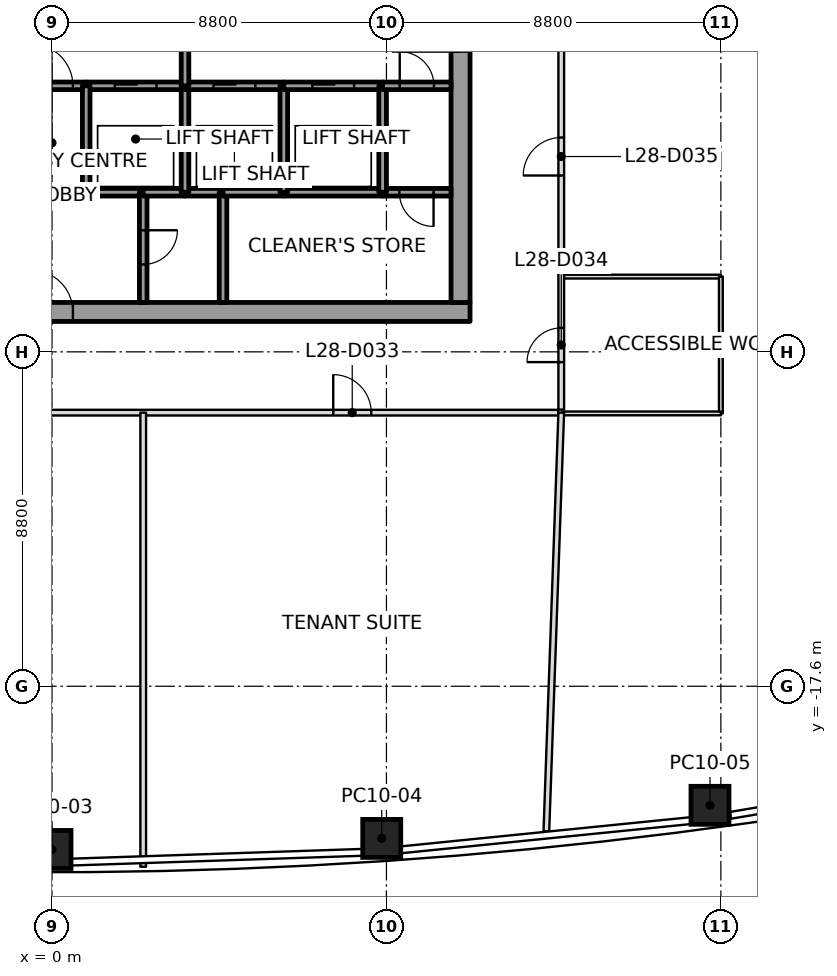
"""IFC4 building model, lengths in metres.
Left out: names, types, materials, properties, quantities, classifications, styles, units other than length and angle.
Written with IfcOpenShell. Run it as: python <this file> out.ifc"""

import sys

from ifc_helpers import new_model, si_unit, direction, frame, frame_2d, origin, origin_2d, place, context, subcontext, project, spatial, rectangle, extrude, element, fill, save


model = new_model("IFC4")
c1 = context("Model", 3, precision=1e-05, world=origin(), true_north=direction((0.0, 1.0)))
c2 = subcontext(c1, "Body", "Model", "MODEL_VIEW")
j1 = project(units=[si_unit("LENGTHUNIT", "METRE"), si_unit("PLANEANGLEUNIT", "RADIAN")], contexts=[c1])
p1 = place(None, origin())
s1 = spatial("IfcSite", under=j1, at=p1, CompositionType="ELEMENT")
p2 = place(p1, origin())
s2 = spatial("IfcBuilding", under=s1, at=p2, CompositionType="ELEMENT")
p3 = place(p2, frame((0.0, 0.0, 133.8)))
s3 = spatial("IfcBuildingStorey", under=s2, at=p3, CompositionType="ELEMENT", Elevation=133.8)
p4 = place(p3, frame((0.0, -21.894, 0.0), z_axis=(0.0, 0.01141283087, 0.999934871525), x_axis=(1.0, 0.0, 0.0)))
e1 = element("IfcColumn", 1, at=p4, inside=s3, PredefinedType="COLUMN", context=c2, shape_type="SweptSolid", body=[
    extrude(rectangle(XDim=1.0, YDim=1.0, at=origin_2d()), origin(), (0.0, 0.0, 1.0), 4.0),
])
p5 = place(p3, frame((8.677, -21.604, 0.0), z_axis=(-0.008849193104, 0.011229320904, 0.999897791843), x_axis=(0.99771962889, 0.067009688007, 0.008077365942)))
e2 = element("IfcColumn", 2, at=p5, inside=s3, PredefinedType="COLUMN", context=c2, shape_type="SweptSolid", body=[
    extrude(rectangle(XDim=1.0, YDim=1.0, at=origin_2d()), origin(), (0.0, 0.0, 1.0), 4.0),
])
p6 = place(p3, frame((17.314, -20.733, 0.0), z_axis=(-0.017696448434, 0.010495824588, 0.999788314284), x_axis=(0.990889638844, 0.133706305787, 0.016135285075)))
e3 = element("IfcColumn", 3, at=p6, inside=s3, PredefinedType="COLUMN", context=c2, shape_type="SweptSolid", body=[
    extrude(rectangle(XDim=1.0, YDim=1.0, at=origin_2d()), origin(), (0.0, 0.0, 1.0), 4.001),
])
p7 = place(p3, frame((-11.0, -7.75, 0.0), z_axis=(0.0, 0.0, 1.0), x_axis=(1.0, 0.0, 0.0)))
e4 = element("IfcWall", 4, at=p7, inside=s3, PredefinedType="SHEAR", context=c2, shape_type="SweptSolid", body=[
    extrude(rectangle(XDim=22.0, YDim=0.5, at=frame_2d((11.0, 0.0))), origin(), (0.0, 0.0, 1.0), 4.0),
])
p8 = place(p7, frame((10.45, 0.0, 0.0)))
e5 = element("IfcOpeningElement", 5, at=p8, cuts=e4, PredefinedType="OPENING", context=c2, shape_type="SweptSolid", body=[
    extrude(rectangle(XDim=1.1, YDim=2.1, at=frame_2d((0.55, 1.05))), frame((0.0, 0.25, 0.0), z_axis=(0.0, -1.0, 0.0), x_axis=(1.0, 0.0, 0.0)), (0.0, 0.0, 1.0), 0.5),
])
p9 = place(p3, frame((10.75, -7.5, 0.0), z_axis=(0.0, 0.0, 1.0), x_axis=(0.0, 1.0, 0.0)))
e6 = element("IfcWall", 6, at=p9, inside=s3, PredefinedType="SHEAR", context=c2, shape_type="SweptSolid", body=[
    extrude(rectangle(XDim=15.0, YDim=0.5, at=frame_2d((7.5, 0.0))), origin(), (0.0, 0.0, 1.0), 4.0),
])
p10 = place(p9, frame((6.6, 0.0, 0.0)))
e7 = element("IfcOpeningElement", 7, at=p10, cuts=e6, PredefinedType="OPENING", context=c2, shape_type="SweptSolid", body=[
    extrude(rectangle(XDim=1.8, YDim=2.1, at=frame_2d((0.9, 1.05))), frame((0.0, 0.25, 0.0), z_axis=(0.0, -1.0, 0.0), x_axis=(1.0, 0.0, 0.0)), (0.0, 0.0, 1.0), 0.5),
])
p11 = place(p3, frame((-0.9, -1.8, 0.0), z_axis=(0.0, 0.0, 1.0), x_axis=(1.0, 0.0, 0.0)))
e8 = element("IfcWall", 8, at=p11, inside=s3, PredefinedType="SOLIDWALL", context=c2, shape_type="SweptSolid", body=[
    extrude(rectangle(XDim=1.8, YDim=0.2, at=frame_2d((0.9, 0.0))), origin(), (0.0, 0.0, 1.0), 3.85),
])
p12 = place(p11, frame((0.35, 0.0, 0.0)))
e9 = element("IfcOpeningElement", 9, at=p12, cuts=e8, PredefinedType="OPENING", context=c2, shape_type="SweptSolid", body=[
    extrude(rectangle(XDim=1.1, YDim=2.1, at=frame_2d((0.55, 1.05))), frame((0.0, 0.1, 0.0), z_axis=(0.0, -1.0, 0.0), x_axis=(1.0, 0.0, 0.0)), (0.0, 0.0, 1.0), 0.2),
])
p13 = place(p3, frame((0.9, -1.8, 0.0), z_axis=(0.0, 0.0, 1.0), x_axis=(1.0, 0.0, 0.0)))
e10 = element("IfcWall", 10, at=p13, inside=s3, PredefinedType="SOLIDWALL", context=c2, shape_type="SweptSolid", body=[
    extrude(rectangle(XDim=2.6, YDim=0.2, at=frame_2d((1.3, 0.0))), origin(), (0.0, 0.0, 1.0), 3.85),
])
p14 = place(p13, frame((0.75, 0.0, 0.0)))
e11 = element("IfcOpeningElement", 11, at=p14, cuts=e10, PredefinedType="OPENING", context=c2, shape_type="SweptSolid", body=[
    extrude(rectangle(XDim=1.1, YDim=2.1, at=frame_2d((0.55, 1.05))), frame((0.0, 0.1, 0.0), z_axis=(0.0, -1.0, 0.0), x_axis=(1.0, 0.0, 0.0)), (0.0, 0.0, 1.0), 0.2),
])
p15 = place(p3, frame((0.9, -1.8, 0.0), z_axis=(0.0, 0.0, 1.0), x_axis=(0.0, -1.0, 0.0)))
e12 = element("IfcWall", 12, at=p15, inside=s3, PredefinedType="SOLIDWALL", context=c2, shape_type="SweptSolid", body=[
    extrude(rectangle(XDim=2.8, YDim=0.2, at=frame_2d((1.4, 0.0))), origin(), (0.0, 0.0, 1.0), 3.85),
])
p16 = place(p3, frame((0.9, -4.6, 0.0), z_axis=(0.0, 0.0, 1.0), x_axis=(1.0, 0.0, 0.0)))
e13 = element("IfcWall", 13, at=p16, inside=s3, PredefinedType="SOLIDWALL", context=c2, shape_type="SweptSolid", body=[
    extrude(rectangle(XDim=1.5, YDim=0.2, at=frame_2d((0.75, 0.0))), origin(), (0.0, 0.0, 1.0), 3.85),
])
p17 = place(p3, frame((2.4, -4.6, 0.0), z_axis=(0.0, 0.0, 1.0), x_axis=(0.0, -1.0, 0.0)))
e14 = element("IfcWall", 14, at=p17, inside=s3, PredefinedType="SOLIDWALL", context=c2, shape_type="SweptSolid", body=[
    extrude(rectangle(XDim=2.9, YDim=0.2, at=frame_2d((1.45, 0.0))), origin(), (0.0, 0.0, 1.0), 3.85),
])
p18 = place(p17, frame((1.0, 0.0, 0.0)))
e15 = element("IfcOpeningElement", 15, at=p18, cuts=e14, PredefinedType="OPENING", context=c2, shape_type="SweptSolid", body=[
    extrude(rectangle(XDim=0.9, YDim=2.1, at=frame_2d((0.45, 1.05))), frame((0.0, 0.1, 0.0), z_axis=(0.0, -1.0, 0.0), x_axis=(1.0, 0.0, 0.0)), (0.0, 0.0, 1.0), 0.2),
])
p19 = place(p3, frame((3.5, -4.6, 0.0), z_axis=(0.0, 0.0, 1.0), x_axis=(-1.0, 0.0, 0.0)))
e16 = element("IfcWall", 16, at=p19, inside=s3, PredefinedType="SOLIDWALL", context=c2, shape_type="SweptSolid", body=[
    extrude(rectangle(XDim=1.1, YDim=0.2, at=frame_2d((0.55, 0.0))), origin(), (0.0, 0.0, 1.0), 3.85),
])
p20 = place(p3, frame((4.5, -4.6, 0.0), z_axis=(0.0, 0.0, 1.0), x_axis=(-1.0, 0.0, 0.0)))
e17 = element("IfcWall", 17, at=p20, inside=s3, PredefinedType="SOLIDWALL", context=c2, shape_type="SweptSolid", body=[
    extrude(rectangle(XDim=1.0, YDim=0.2, at=frame_2d((0.5, 0.0))), origin(), (0.0, 0.0, 1.0), 3.85),
])
p21 = place(p3, frame((3.5, -4.6, 0.0), z_axis=(0.0, 0.0, 1.0), x_axis=(0.0, 1.0, 0.0)))
e18 = element("IfcWall", 18, at=p21, inside=s3, PredefinedType="SOLIDWALL", context=c2, shape_type="SweptSolid", body=[
    extrude(rectangle(XDim=2.8, YDim=0.2, at=frame_2d((1.4, 0.0))), origin(), (0.0, 0.0, 1.0), 3.85),
])
p22 = place(p3, frame((3.5, -1.8, 0.0), z_axis=(0.0, 0.0, 1.0), x_axis=(1.0, 0.0, 0.0)))
e19 = element("IfcWall", 19, at=p22, inside=s3, PredefinedType="SOLIDWALL", context=c2, shape_type="SweptSolid", body=[
    extrude(rectangle(XDim=2.6, YDim=0.2, at=frame_2d((1.3, 0.0))), origin(), (0.0, 0.0, 1.0), 3.85),
])
p23 = place(p22, frame((0.75, 0.0, 0.0)))
e20 = element("IfcOpeningElement", 20, at=p23, cuts=e19, PredefinedType="OPENING", context=c2, shape_type="SweptSolid", body=[
    extrude(rectangle(XDim=1.1, YDim=2.1, at=frame_2d((0.55, 1.05))), frame((0.0, 0.1, 0.0), z_axis=(0.0, -1.0, 0.0), x_axis=(1.0, 0.0, 0.0)), (0.0, 0.0, 1.0), 0.2),
])
p24 = place(p3, frame((3.5, -1.8, 0.0), z_axis=(0.0, 0.0, 1.0), x_axis=(0.0, 1.0, 0.0)))
e21 = element("IfcWall", 21, at=p24, inside=s3, PredefinedType="SOLIDWALL", context=c2, shape_type="SweptSolid", body=[
    extrude(rectangle(XDim=3.6, YDim=0.2, at=frame_2d((1.8, 0.0))), origin(), (0.0, 0.0, 1.0), 3.85),
])
p25 = place(p24, frame((1.05, 0.0, 0.0)))
e22 = element("IfcOpeningElement", 22, at=p25, cuts=e21, PredefinedType="OPENING", context=c2, shape_type="SweptSolid", body=[
    extrude(rectangle(XDim=1.5, YDim=2.1, at=frame_2d((0.75, 1.05))), frame((0.0, 0.1, 0.0), z_axis=(0.0, -1.0, 0.0), x_axis=(1.0, 0.0, 0.0)), (0.0, 0.0, 1.0), 0.2),
])
p26 = place(p3, frame((4.5, -4.6, 0.0), z_axis=(0.0, 0.0, 1.0), x_axis=(0.0, -1.0, 0.0)))
e23 = element("IfcWall", 23, at=p26, inside=s3, PredefinedType="SOLIDWALL", context=c2, shape_type="SweptSolid", body=[
    extrude(rectangle(XDim=2.9, YDim=0.2, at=frame_2d((1.45, 0.0))), origin(), (0.0, 0.0, 1.0), 3.85),
])
p27 = place(p3, frame((6.1, -4.6, 0.0), z_axis=(0.0, 0.0, 1.0), x_axis=(-1.0, 0.0, 0.0)))
e24 = element("IfcWall", 24, at=p27, inside=s3, PredefinedType="SOLIDWALL", context=c2, shape_type="SweptSolid", body=[
    extrude(rectangle(XDim=1.6, YDim=0.2, at=frame_2d((0.8, 0.0))), origin(), (0.0, 0.0, 1.0), 3.85),
])
p28 = place(p3, frame((8.7, -4.6, 0.0), z_axis=(0.0, 0.0, 1.0), x_axis=(-1.0, 0.0, 0.0)))
e25 = element("IfcWall", 25, at=p28, inside=s3, PredefinedType="SOLIDWALL", context=c2, shape_type="SweptSolid", body=[
    extrude(rectangle(XDim=2.6, YDim=0.2, at=frame_2d((1.3, 0.0))), origin(), (0.0, 0.0, 1.0), 3.85),
])
p29 = place(p3, frame((6.1, -4.6, 0.0), z_axis=(0.0, 0.0, 1.0), x_axis=(0.0, 1.0, 0.0)))
e26 = element("IfcWall", 26, at=p29, inside=s3, PredefinedType="SOLIDWALL", context=c2, shape_type="SweptSolid", body=[
    extrude(rectangle(XDim=2.8, YDim=0.2, at=frame_2d((1.4, 0.0))), origin(), (0.0, 0.0, 1.0), 3.85),
])
p30 = place(p3, frame((6.1, -1.8, 0.0), z_axis=(0.0, 0.0, 1.0), x_axis=(1.0, 0.0, 0.0)))
e27 = element("IfcWall", 27, at=p30, inside=s3, PredefinedType="SOLIDWALL", context=c2, shape_type="SweptSolid", body=[
    extrude(rectangle(XDim=2.6, YDim=0.2, at=frame_2d((1.3, 0.0))), origin(), (0.0, 0.0, 1.0), 3.85),
])
p31 = place(p30, frame((0.75, 0.0, 0.0)))
e28 = element("IfcOpeningElement", 28, at=p31, cuts=e27, PredefinedType="OPENING", context=c2, shape_type="SweptSolid", body=[
    extrude(rectangle(XDim=1.1, YDim=2.1, at=frame_2d((0.55, 1.05))), frame((0.0, 0.1, 0.0), z_axis=(0.0, -1.0, 0.0), x_axis=(1.0, 0.0, 0.0)), (0.0, 0.0, 1.0), 0.2),
])
p32 = place(p3, frame((10.5, -4.6, 0.0), z_axis=(0.0, 0.0, 1.0), x_axis=(-1.0, 0.0, 0.0)))
e29 = element("IfcWall", 29, at=p32, inside=s3, PredefinedType="SOLIDWALL", context=c2, shape_type="SweptSolid", body=[
    extrude(rectangle(XDim=1.8, YDim=0.2, at=frame_2d((0.9, 0.0))), origin(), (0.0, 0.0, 1.0), 3.85),
])
p33 = place(p32, frame((0.46, 0.0, 0.0)))
e30 = element("IfcOpeningElement", 30, at=p33, cuts=e29, PredefinedType="OPENING", context=c2, shape_type="SweptSolid", body=[
    extrude(rectangle(XDim=0.9, YDim=2.1, at=frame_2d((0.45, 1.05))), frame((0.0, 0.1, 0.0), z_axis=(0.0, -1.0, 0.0), x_axis=(1.0, 0.0, 0.0)), (0.0, 0.0, 1.0), 0.2),
])
p34 = place(p3, frame((8.7, -1.8, 0.0), z_axis=(0.0, 0.0, 1.0), x_axis=(0.0, -1.0, 0.0)))
e31 = element("IfcWall", 31, at=p34, inside=s3, PredefinedType="SOLIDWALL", context=c2, shape_type="SweptSolid", body=[
    extrude(rectangle(XDim=2.8, YDim=0.2, at=frame_2d((1.4, 0.0))), origin(), (0.0, 0.0, 1.0), 3.85),
])
p35 = place(p3, frame((8.7, -1.8, 0.0), z_axis=(0.0, 0.0, 1.0), x_axis=(1.0, 0.0, 0.0)))
e32 = element("IfcWall", 32, at=p35, inside=s3, PredefinedType="SOLIDWALL", context=c2, shape_type="SweptSolid", body=[
    extrude(rectangle(XDim=1.8, YDim=0.2, at=frame_2d((0.9, 0.0))), origin(), (0.0, 0.0, 1.0), 3.85),
])
p36 = place(p35, frame((0.45, 0.0, 0.0)))
e33 = element("IfcOpeningElement", 33, at=p36, cuts=e32, PredefinedType="OPENING", context=c2, shape_type="SweptSolid", body=[
    extrude(rectangle(XDim=0.9, YDim=2.1, at=frame_2d((0.45, 1.05))), frame((0.0, 0.1, 0.0), z_axis=(0.0, -1.0, 0.0), x_axis=(1.0, 0.0, 0.0)), (0.0, 0.0, 1.0), 0.2),
])
p37 = place(p3, frame((2.4, -10.4, 0.0), z_axis=(0.0, 0.0, 1.0), x_axis=(0.0, -1.0, 0.0)))
e34 = element("IfcWall", 34, at=p37, inside=s3, PredefinedType="PARTITIONING", context=c2, shape_type="SweptSolid", body=[
    extrude(rectangle(XDim=11.949, YDim=0.15, at=frame_2d((5.975, 0.0))), origin(), (0.0, 0.0, 1.0), 3.234),
])
p38 = place(p3, frame((13.4, -10.4, 0.0), z_axis=(0.0, 0.0, 1.0), x_axis=(-0.035539097782, -0.999368286734, 0.0)))
e35 = element("IfcWall", 35, at=p38, inside=s3, PredefinedType="PARTITIONING", context=c2, shape_type="SweptSolid", body=[
    extrude(rectangle(XDim=11.026, YDim=0.15, at=frame_2d((5.513, 0.0))), origin(), (0.0, 0.0, 1.0), 3.234),
])
p39 = place(p3, frame((-13.32, -10.4, 0.0), z_axis=(0.0, 0.0, 1.0), x_axis=(1.0, 0.0, 0.0)))
e36 = element("IfcWall", 36, at=p39, inside=s3, PredefinedType="PARTITIONING", context=c2, shape_type="SweptSolid", body=[
    extrude(rectangle(XDim=26.64, YDim=0.15, at=frame_2d((13.32, 0.0))), origin(), (0.0, 0.0, 1.0), 3.317),
])
p40 = place(p39, frame((1.97, 0.0, 0.0)))
e37 = element("IfcOpeningElement", 37, at=p40, cuts=e36, PredefinedType="OPENING", context=c2, shape_type="SweptSolid", body=[
    extrude(rectangle(XDim=0.9, YDim=2.1, at=frame_2d((0.45, 1.05))), frame((0.0, 0.075, 0.0), z_axis=(0.0, -1.0, 0.0), x_axis=(1.0, 0.0, 0.0)), (0.0, 0.0, 1.0), 0.15),
])
p41 = place(p39, frame((9.87, 0.0, 0.0)))
e38 = element("IfcOpeningElement", 38, at=p41, cuts=e36, PredefinedType="OPENING", context=c2, shape_type="SweptSolid", body=[
    extrude(rectangle(XDim=1.0, YDim=2.1, at=frame_2d((0.5, 1.05))), frame((0.0, 0.075, 0.0), z_axis=(0.0, -1.0, 0.0), x_axis=(1.0, 0.0, 0.0)), (0.0, 0.0, 1.0), 0.15),
])
p42 = place(p39, frame((20.72, 0.0, 0.0)))
e39 = element("IfcOpeningElement", 39, at=p42, cuts=e36, PredefinedType="OPENING", context=c2, shape_type="SweptSolid", body=[
    extrude(rectangle(XDim=1.0, YDim=2.1, at=frame_2d((0.5, 1.05))), frame((0.0, 0.075, 0.0), z_axis=(0.0, -1.0, 0.0), x_axis=(1.0, 0.0, 0.0)), (0.0, 0.0, 1.0), 0.15),
])
p43 = place(p3, frame((13.4, -10.32, 0.0), z_axis=(0.0, 0.0, 1.0), x_axis=(0.0, 1.0, 0.0)))
e40 = element("IfcWall", 40, at=p43, inside=s3, PredefinedType="PARTITIONING", context=c2, shape_type="SweptSolid", body=[
    extrude(rectangle(XDim=20.64, YDim=0.15, at=frame_2d((10.32, 0.0))), origin(), (0.0, 0.0, 1.0), 3.166),
])
p44 = place(p43, frame((14.72, 0.0, 0.0)))
e41 = element("IfcOpeningElement", 41, at=p44, cuts=e40, PredefinedType="OPENING", context=c2, shape_type="SweptSolid", body=[
    extrude(rectangle(XDim=1.0, YDim=2.1, at=frame_2d((0.5, 1.05))), frame((0.0, 0.075, 0.0), z_axis=(0.0, -1.0, 0.0), x_axis=(1.0, 0.0, 0.0)), (0.0, 0.0, 1.0), 0.15),
])
p45 = place(p43, frame((1.25, 0.0, 0.0)))
e42 = element("IfcOpeningElement", 42, at=p45, cuts=e40, PredefinedType="OPENING", context=c2, shape_type="SweptSolid", body=[
    extrude(rectangle(XDim=0.9, YDim=2.1, at=frame_2d((0.45, 1.05))), frame((0.0, 0.075, 0.0), z_axis=(0.0, -1.0, 0.0), x_axis=(1.0, 0.0, 0.0)), (0.0, 0.0, 1.0), 0.15),
])
p46 = place(p43, frame((6.16, 0.0, 0.0)))
e43 = element("IfcOpeningElement", 43, at=p46, cuts=e40, PredefinedType="OPENING", context=c2, shape_type="SweptSolid", body=[
    extrude(rectangle(XDim=1.0, YDim=2.1, at=frame_2d((0.5, 1.05))), frame((0.0, 0.075, 0.0), z_axis=(0.0, -1.0, 0.0), x_axis=(1.0, 0.0, 0.0)), (0.0, 0.0, 1.0), 0.15),
])
p47 = place(p3, frame((13.43, -6.82, 0.0), z_axis=(0.0, 0.0, 1.0), x_axis=(1.0, 0.0, 0.0)))
e44 = element("IfcWall", 44, at=p47, inside=s3, PredefinedType="PARTITIONING", context=c2, shape_type="SweptSolid", body=[
    extrude(rectangle(XDim=4.17, YDim=0.1, at=frame_2d((2.085, 0.0))), origin(), (0.0, 0.0, 1.0), 3.247),
])
p48 = place(p3, frame((17.6, -6.82, 0.0), z_axis=(0.0, 0.0, 1.0), x_axis=(0.0, -1.0, 0.0)))
e45 = element("IfcWall", 45, at=p48, inside=s3, PredefinedType="PARTITIONING", context=c2, shape_type="SweptSolid", body=[
    extrude(rectangle(XDim=3.6, YDim=0.1, at=frame_2d((1.8, 0.0))), origin(), (0.0, 0.0, 1.0), 3.45),
])
p49 = place(p3, frame((17.6, -10.42, 0.0), z_axis=(0.0, 0.0, 1.0), x_axis=(-1.0, 0.0, 0.0)))
e46 = element("IfcWall", 46, at=p49, inside=s3, PredefinedType="PARTITIONING", context=c2, shape_type="SweptSolid", body=[
    extrude(rectangle(XDim=4.17, YDim=0.1, at=frame_2d((2.085, 0.0))), origin(), (0.0, 0.0, 1.0), 3.166),
])
p50 = place(p42, origin())
e47 = element("IfcDoor", 47, at=p50, inside=s3, OperationType="SINGLE_SWING_LEFT", PredefinedType="DOOR", context=c2, shape_type="SweptSolid", body=[
    extrude(rectangle(XDim=1.0, YDim=2.1, at=frame_2d((0.5, 1.05))), frame((0.0, 0.025, 0.0), z_axis=(0.0, -1.0, 0.0), x_axis=(1.0, 0.0, 0.0)), (0.0, 0.0, 1.0), 0.05),
])
fill(e39, e47)
p51 = place(p45, origin())
e48 = element("IfcDoor", 48, at=p51, inside=s3, OperationType="SINGLE_SWING_RIGHT", PredefinedType="DOOR", context=c2, shape_type="SweptSolid", body=[
    extrude(rectangle(XDim=0.9, YDim=2.1, at=frame_2d((0.45, 1.05))), frame((0.0, 0.025, 0.0), z_axis=(0.0, -1.0, 0.0), x_axis=(1.0, 0.0, 0.0)), (0.0, 0.0, 1.0), 0.05),
])
fill(e42, e48)
p52 = place(p46, origin())
e49 = element("IfcDoor", 49, at=p52, inside=s3, OperationType="SINGLE_SWING_RIGHT", PredefinedType="DOOR", context=c2, shape_type="SweptSolid", body=[
    extrude(rectangle(XDim=1.0, YDim=2.1, at=frame_2d((0.5, 1.05))), frame((0.0, 0.025, 0.0), z_axis=(0.0, -1.0, 0.0), x_axis=(1.0, 0.0, 0.0)), (0.0, 0.0, 1.0), 0.05),
])
fill(e43, e49)
p53 = place(p14, origin())
e50 = element("IfcDoor", 50, at=p53, inside=s3, OperationType="SLIDING_TO_LEFT", PredefinedType="DOOR", context=c2, shape_type="SweptSolid", body=[
    extrude(rectangle(XDim=1.1, YDim=2.1, at=frame_2d((0.55, 1.05))), frame((0.0, 0.025, 0.0), z_axis=(0.0, -1.0, 0.0), x_axis=(1.0, 0.0, 0.0)), (0.0, 0.0, 1.0), 0.05),
])
fill(e11, e50)
p54 = place(p23, origin())
e51 = element("IfcDoor", 51, at=p54, inside=s3, OperationType="SLIDING_TO_LEFT", PredefinedType="DOOR", context=c2, shape_type="SweptSolid", body=[
    extrude(rectangle(XDim=1.1, YDim=2.1, at=frame_2d((0.55, 1.05))), frame((0.0, 0.025, 0.0), z_axis=(0.0, -1.0, 0.0), x_axis=(1.0, 0.0, 0.0)), (0.0, 0.0, 1.0), 0.05),
])
fill(e20, e51)
p55 = place(p31, origin())
e52 = element("IfcDoor", 52, at=p55, inside=s3, OperationType="SLIDING_TO_LEFT", PredefinedType="DOOR", context=c2, shape_type="SweptSolid", body=[
    extrude(rectangle(XDim=1.1, YDim=2.1, at=frame_2d((0.55, 1.05))), frame((0.0, 0.025, 0.0), z_axis=(0.0, -1.0, 0.0), x_axis=(1.0, 0.0, 0.0)), (0.0, 0.0, 1.0), 0.05),
])
fill(e28, e52)
p56 = place(p12, origin())
e53 = element("IfcDoor", 53, at=p56, inside=s3, OperationType="SINGLE_SWING_RIGHT", PredefinedType="DOOR", context=c2, shape_type="SweptSolid", body=[
    extrude(rectangle(XDim=1.1, YDim=2.1, at=frame_2d((0.55, 1.05))), frame((0.0, 0.025, 0.0), z_axis=(0.0, -1.0, 0.0), x_axis=(1.0, 0.0, 0.0)), (0.0, 0.0, 1.0), 0.05),
])
fill(e9, e53)
p57 = place(p33, origin())
e54 = element("IfcDoor", 54, at=p57, inside=s3, OperationType="SINGLE_SWING_LEFT", PredefinedType="DOOR", context=c2, shape_type="SweptSolid", body=[
    extrude(rectangle(XDim=0.9, YDim=2.1, at=frame_2d((0.45, 1.05))), frame((0.0, 0.025, 0.0), z_axis=(0.0, -1.0, 0.0), x_axis=(1.0, 0.0, 0.0)), (0.0, 0.0, 1.0), 0.05),
])
fill(e30, e54)
p58 = place(p36, origin())
e55 = element("IfcDoor", 55, at=p58, inside=s3, OperationType="SINGLE_SWING_RIGHT", PredefinedType="DOOR", context=c2, shape_type="SweptSolid", body=[
    extrude(rectangle(XDim=0.9, YDim=2.1, at=frame_2d((0.45, 1.05))), frame((0.0, 0.025, 0.0), z_axis=(0.0, -1.0, 0.0), x_axis=(1.0, 0.0, 0.0)), (0.0, 0.0, 1.0), 0.05),
])
fill(e33, e55)
p59 = place(p18, origin())
e56 = element("IfcDoor", 56, at=p59, inside=s3, OperationType="SINGLE_SWING_RIGHT", PredefinedType="DOOR", context=c2, shape_type="SweptSolid", body=[
    extrude(rectangle(XDim=0.9, YDim=2.1, at=frame_2d((0.45, 1.05))), frame((0.0, 0.025, 0.0), z_axis=(0.0, -1.0, 0.0), x_axis=(1.0, 0.0, 0.0)), (0.0, 0.0, 1.0), 0.05),
])
fill(e15, e56)
p60 = place(p10, origin())
e57 = element("IfcDoor", 57, at=p60, inside=s3, OperationType="DOUBLE_DOOR_SINGLE_SWING", PredefinedType="DOOR", context=c2, shape_type="SweptSolid", body=[
    extrude(rectangle(XDim=1.8, YDim=2.1, at=frame_2d((0.9, 1.05))), frame((0.0, 0.025, 0.0), z_axis=(0.0, -1.0, 0.0), x_axis=(1.0, 0.0, 0.0)), (0.0, 0.0, 1.0), 0.05),
])
fill(e7, e57)
p61 = place(p8, origin())
e58 = element("IfcDoor", 58, at=p61, inside=s3, OperationType="SINGLE_SWING_RIGHT", PredefinedType="DOOR", context=c2, shape_type="SweptSolid", body=[
    extrude(rectangle(XDim=1.1, YDim=2.1, at=frame_2d((0.55, 1.05))), frame((0.0, 0.025, 0.0), z_axis=(0.0, -1.0, 0.0), x_axis=(1.0, 0.0, 0.0)), (0.0, 0.0, 1.0), 0.05),
])
fill(e5, e58)
save(model, sys.argv[1])
